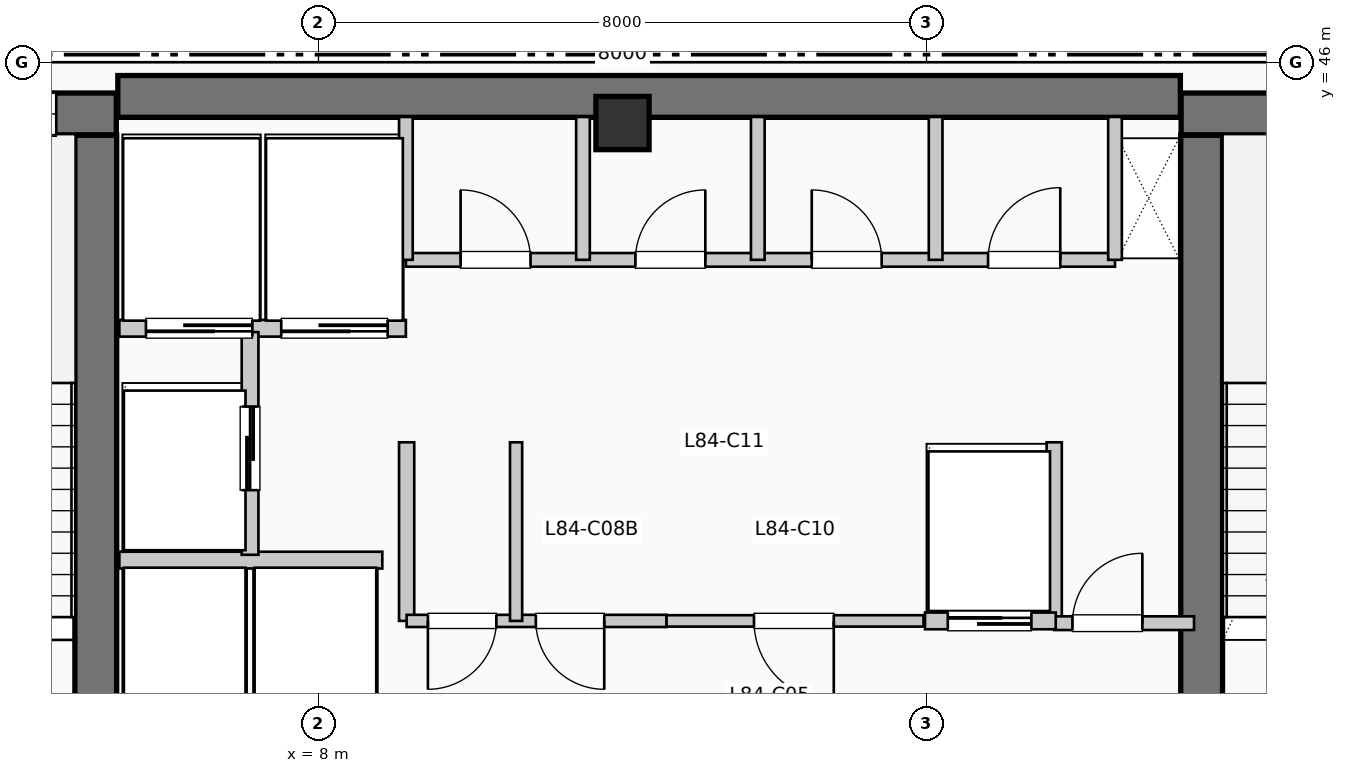
"""IFC4 building model, lengths in metres.
Left out: names, types, materials, properties, quantities, classifications, styles, units other than length and angle.
Written with IfcOpenShell. Run it as: python <this file> out.ifc"""

import sys

from ifc_helpers import new_model, si_unit, direction, frame, frame_2d, origin, origin_2d, place, context, subcontext, project, spatial, rectangle, extrude, element, fill, save


model = new_model("IFC4")
c1 = context("Model", 3, precision=1e-05, world=origin(), true_north=direction((0.0, 1.0)))
c2 = subcontext(c1, "Body", "Model", "MODEL_VIEW")
j1 = project(units=[si_unit("LENGTHUNIT", "METRE"), si_unit("PLANEANGLEUNIT", "RADIAN")], contexts=[c1])
p1 = place(None, origin())
s1 = spatial("IfcSite", under=j1, at=p1, CompositionType="ELEMENT")
p2 = place(p1, origin())
s2 = spatial("IfcBuilding", under=s1, at=p2, CompositionType="ELEMENT")
p3 = place(p2, frame((0.0, 0.0, 343.53)))
s3 = spatial("IfcBuildingStorey", under=s2, at=p3, CompositionType="ELEMENT", Elevation=343.53)
p4 = place(p3, frame((5.36, 45.55, 0.0), z_axis=(0.0, 0.0, 1.0), x_axis=(1.0, 0.0, 0.0)))
e1 = element("IfcWall", 1, at=p4, inside=s3, PredefinedType="SHEAR", context=c2, shape_type="SweptSolid", body=[
    extrude(rectangle(XDim=13.98, YDim=0.55, at=frame_2d((6.99, 0.0))), origin(), (0.0, 0.0, 1.0), 3.96),
])
p5 = place(p3, frame((5.07, 37.15, 0.0), z_axis=(0.0, 0.0, 1.0), x_axis=(0.0, 1.0, 0.0)))
e2 = element("IfcWall", 2, at=p5, inside=s3, PredefinedType="SHEAR", context=c2, shape_type="SweptSolid", body=[
    extrude(rectangle(XDim=7.89, YDim=0.55, at=frame_2d((3.945, 0.0))), origin(), (0.0, 0.0, 1.0), 3.96),
])
p6 = place(p3, frame((1.1, 45.32, 0.0), z_axis=(0.0, 0.0, 1.0), x_axis=(1.0, 0.0, 0.0)))
e3 = element("IfcWall", 3, at=p6, inside=s3, PredefinedType="SHEAR", context=c2, shape_type="SweptSolid", body=[
    extrude(rectangle(XDim=4.24, YDim=0.55, at=frame_2d((2.12, 0.0))), origin(), (0.0, 0.0, 1.0), 3.96),
])
p7 = place(p6, frame((2.05, 0.0, 1.05)))
e4 = element("IfcOpeningElement", 4, at=p7, cuts=e3, PredefinedType="OPENING", context=c2, shape_type="SweptSolid", body=[
    extrude(rectangle(XDim=1.4, YDim=1.8, at=frame_2d((0.7, 0.9))), frame((0.0, 0.285, 0.0), z_axis=(0.0, -1.0, 0.0), x_axis=(1.0, 0.0, 0.0)), (0.0, 0.0, 1.0), 0.57),
])
p8 = place(p3, frame((19.62, 37.15, 0.0), z_axis=(0.0, 0.0, 1.0), x_axis=(0.0, 1.0, 0.0)))
e5 = element("IfcWall", 5, at=p8, inside=s3, PredefinedType="SHEAR", context=c2, shape_type="SweptSolid", body=[
    extrude(rectangle(XDim=7.89, YDim=0.55, at=frame_2d((3.945, 0.0))), origin(), (0.0, 0.0, 1.0), 3.96),
])
p9 = place(p3, frame((19.35, 45.32, 0.0), z_axis=(0.0, 0.0, 1.0), x_axis=(1.0, 0.0, 0.0)))
e6 = element("IfcWall", 6, at=p9, inside=s3, PredefinedType="SHEAR", context=c2, shape_type="SweptSolid", body=[
    extrude(rectangle(XDim=3.69, YDim=0.55, at=frame_2d((1.845, 0.0))), origin(), (0.0, 0.0, 1.0), 3.96),
])
p10 = place(p9, frame((1.15, 0.0, 1.05)))
e7 = element("IfcOpeningElement", 7, at=p10, cuts=e6, PredefinedType="OPENING", context=c2, shape_type="SweptSolid", body=[
    extrude(rectangle(XDim=1.4, YDim=1.8, at=frame_2d((0.7, 0.9))), frame((0.0, 0.285, 0.0), z_axis=(0.0, -1.0, 0.0), x_axis=(1.0, 0.0, 0.0)), (0.0, 0.0, 1.0), 0.57),
])
p11 = place(p3, frame((12.0, 45.2, 0.0), z_axis=(0.0, 0.0, 1.0), x_axis=(1.0, 0.0, 0.0)))
e8 = element("IfcColumn", 8, at=p11, inside=s3, PredefinedType="COLUMN", context=c2, shape_type="SweptSolid", body=[
    extrude(rectangle(XDim=0.7, YDim=0.7, at=origin_2d()), origin(), (0.0, 0.0, 1.0), 3.96),
])
p12 = place(p3, frame((5.38, 39.45, 0.0), z_axis=(0.0, 0.0, 1.0), x_axis=(1.0, 0.0, 0.0)))
e9 = element("IfcWall", 9, at=p12, inside=s3, PredefinedType="PARTITIONING", context=c2, shape_type="SweptSolid", body=[
    extrude(rectangle(XDim=3.46, YDim=0.22, at=frame_2d((1.73, 0.0))), origin(), (0.0, 0.0, 1.0), 3.71),
])
p13 = place(p3, frame((5.38, 42.5, 0.0), z_axis=(0.0, 0.0, 1.0), x_axis=(1.0, 0.0, 0.0)))
e10 = element("IfcWall", 10, at=p13, inside=s3, PredefinedType="PARTITIONING", context=c2, shape_type="SweptSolid", body=[
    extrude(rectangle(XDim=3.77, YDim=0.22, at=frame_2d((1.885, 0.0))), origin(), (0.0, 0.0, 1.0), 3.71),
])
p14 = place(p13, frame((1.75, 0.0, 0.0), z_axis=(0.0, 0.0, 1.0), x_axis=(-1.0, 0.0, 0.0)))
e11 = element("IfcOpeningElement", 11, at=p14, cuts=e10, PredefinedType="OPENING", context=c2, shape_type="SweptSolid", body=[
    extrude(rectangle(XDim=1.4, YDim=2.2, at=frame_2d((0.7, 1.1))), frame((0.0, 0.12, 0.0), z_axis=(0.0, -1.0, 0.0), x_axis=(1.0, 0.0, 0.0)), (0.0, 0.0, 1.0), 0.24),
])
p15 = place(p13, frame((3.53, 0.0, 0.0), z_axis=(0.0, 0.0, 1.0), x_axis=(-1.0, 0.0, 0.0)))
e12 = element("IfcOpeningElement", 12, at=p15, cuts=e10, PredefinedType="OPENING", context=c2, shape_type="SweptSolid", body=[
    extrude(rectangle(XDim=1.4, YDim=2.2, at=frame_2d((0.7, 1.1))), frame((0.0, 0.12, 0.0), z_axis=(0.0, -1.0, 0.0), x_axis=(1.0, 0.0, 0.0)), (0.0, 0.0, 1.0), 0.24),
])
p16 = place(p3, frame((7.1, 39.52, 0.0), z_axis=(0.0, 0.0, 1.0), x_axis=(0.0, 1.0, 0.0)))
e13 = element("IfcWall", 13, at=p16, inside=s3, PredefinedType="PARTITIONING", context=c2, shape_type="SweptSolid", body=[
    extrude(rectangle(XDim=2.93, YDim=0.22, at=frame_2d((1.465, 0.0))), origin(), (0.0, 0.0, 1.0), 3.71),
])
p17 = place(p16, frame((0.85, 0.0, 0.0)))
e14 = element("IfcOpeningElement", 14, at=p17, cuts=e13, PredefinedType="OPENING", context=c2, shape_type="SweptSolid", body=[
    extrude(rectangle(XDim=1.1, YDim=2.2, at=frame_2d((0.55, 1.1))), frame((0.0, 0.12, 0.0), z_axis=(0.0, -1.0, 0.0), x_axis=(1.0, 0.0, 0.0)), (0.0, 0.0, 1.0), 0.24),
])
for number, where, z_axis, x_axis in (
    (15, (9.16, 38.65, 0.0), (0.0, 0.0, 1.0), (0.0, 1.0, 0.0)),
    (16, (17.68, 38.65, 0.0), (0.0, 0.0, 1.0), (0.0, 1.0, 0.0)),
):
    element("IfcWall", number, at=place(p3, frame(where, z_axis=z_axis, x_axis=x_axis)), inside=s3, PredefinedType="PARTITIONING", context=c2, shape_type="SweptSolid", body=[
        extrude(rectangle(XDim=2.35, YDim=0.2, at=frame_2d((1.175, 0.0))), origin(), (0.0, 0.0, 1.0), 3.71),
    ])
p18 = place(p3, frame((17.68, 38.62, 0.0), z_axis=(0.0, 0.0, 1.0), x_axis=(1.0, 0.0, 0.0)))
e17 = element("IfcWall", 17, at=p18, inside=s3, PredefinedType="PARTITIONING", context=c2, shape_type="SweptSolid", body=[
    extrude(rectangle(XDim=1.84, YDim=0.18, at=frame_2d((0.92, 0.0))), origin(), (0.0, 0.0, 1.0), 3.71),
])
p19 = place(p18, frame((0.24, 0.0, 0.0)))
e18 = element("IfcOpeningElement", 18, at=p19, cuts=e17, PredefinedType="OPENING", context=c2, shape_type="SweptSolid", body=[
    extrude(rectangle(XDim=0.92, YDim=2.1, at=frame_2d((0.46, 1.05))), frame((0.0, 0.1, 0.0), z_axis=(0.0, -1.0, 0.0), x_axis=(1.0, 0.0, 0.0)), (0.0, 0.0, 1.0), 0.2),
])
p20 = place(p3, frame((9.16, 38.65, 0.0), z_axis=(0.0, 0.0, 1.0), x_axis=(1.0, 0.0, 0.0)))
e19 = element("IfcWall", 19, at=p20, inside=s3, PredefinedType="PARTITIONING", context=c2, shape_type="SweptSolid", body=[
    extrude(rectangle(XDim=3.42, YDim=0.16, at=frame_2d((1.71, 0.0))), origin(), (0.0, 0.0, 1.0), 3.71),
])
p21 = place(p20, frame((1.18, 0.0, 0.0), z_axis=(0.0, 0.0, 1.0), x_axis=(-1.0, 0.0, 0.0)))
e20 = element("IfcOpeningElement", 20, at=p21, cuts=e19, PredefinedType="OPENING", context=c2, shape_type="SweptSolid", body=[
    extrude(rectangle(XDim=0.9, YDim=2.15, at=frame_2d((0.45, 1.075))), frame((0.0, 0.09, 0.0), z_axis=(0.0, -1.0, 0.0), x_axis=(1.0, 0.0, 0.0)), (0.0, 0.0, 1.0), 0.18),
])
p22 = place(p20, frame((2.6, 0.0, 0.0), z_axis=(0.0, 0.0, 1.0), x_axis=(-1.0, 0.0, 0.0)))
e21 = element("IfcOpeningElement", 21, at=p22, cuts=e19, PredefinedType="OPENING", context=c2, shape_type="SweptSolid", body=[
    extrude(rectangle(XDim=0.9, YDim=2.15, at=frame_2d((0.45, 1.075))), frame((0.0, 0.09, 0.0), z_axis=(0.0, -1.0, 0.0), x_axis=(1.0, 0.0, 0.0)), (0.0, 0.0, 1.0), 0.18),
])
p23 = place(p3, frame((10.6, 38.65, 0.0), z_axis=(0.0, 0.0, 1.0), x_axis=(0.0, 1.0, 0.0)))
e22 = element("IfcWall", 22, at=p23, inside=s3, PredefinedType="PARTITIONING", context=c2, shape_type="SweptSolid", body=[
    extrude(rectangle(XDim=2.35, YDim=0.16, at=frame_2d((1.175, 0.0))), origin(), (0.0, 0.0, 1.0), 3.71),
])
p24 = place(p3, frame((12.58, 38.65, 0.0), z_axis=(0.0, 0.0, 1.0), x_axis=(1.0, 0.0, 0.0)))
e23 = element("IfcWall", 23, at=p24, inside=s3, PredefinedType="PARTITIONING", context=c2, shape_type="SweptSolid", body=[
    extrude(rectangle(XDim=3.38, YDim=0.15, at=frame_2d((1.69, 0.0))), origin(), (0.0, 0.0, 1.0), 3.71),
])
p25 = place(p24, frame((2.2, 0.0, 0.0), z_axis=(0.0, 0.0, 1.0), x_axis=(-1.0, 0.0, 0.0)))
e24 = element("IfcOpeningElement", 24, at=p25, cuts=e23, PredefinedType="OPENING", context=c2, shape_type="SweptSolid", body=[
    extrude(rectangle(XDim=1.05, YDim=2.15, at=frame_2d((0.525, 1.075))), frame((0.0, 0.085, 0.0), z_axis=(0.0, -1.0, 0.0), x_axis=(1.0, 0.0, 0.0)), (0.0, 0.0, 1.0), 0.17),
])
p26 = place(p3, frame((15.98, 38.65, 0.0), z_axis=(0.0, 0.0, 1.0), x_axis=(1.0, 0.0, 0.0)))
e25 = element("IfcWall", 25, at=p26, inside=s3, PredefinedType="PARTITIONING", context=c2, shape_type="SweptSolid", body=[
    extrude(rectangle(XDim=1.72, YDim=0.22, at=frame_2d((0.86, 0.0))), origin(), (0.0, 0.0, 1.0), 3.71),
])
p27 = place(p26, frame((0.3, 0.0, 0.0)))
e26 = element("IfcOpeningElement", 26, at=p27, cuts=e25, PredefinedType="OPENING", context=c2, shape_type="SweptSolid", body=[
    extrude(rectangle(XDim=1.1, YDim=2.2, at=frame_2d((0.55, 1.1))), frame((0.0, 0.12, 0.0), z_axis=(0.0, -1.0, 0.0), x_axis=(1.0, 0.0, 0.0)), (0.0, 0.0, 1.0), 0.24),
])
p28 = place(p3, frame((9.15, 43.4, 0.0), z_axis=(0.0, 0.0, 1.0), x_axis=(1.0, 0.0, 0.0)))
e27 = element("IfcWall", 27, at=p28, inside=s3, PredefinedType="PLUMBINGWALL", context=c2, shape_type="SweptSolid", body=[
    extrude(rectangle(XDim=9.33, YDim=0.18, at=frame_2d((4.665, 0.0))), origin(), (0.0, 0.0, 1.0), 3.71),
])
p29 = place(p28, frame((0.72, 0.0, 0.0)))
e28 = element("IfcOpeningElement", 28, at=p29, cuts=e27, PredefinedType="OPENING", context=c2, shape_type="SweptSolid", body=[
    extrude(rectangle(XDim=0.92, YDim=2.1, at=frame_2d((0.46, 1.05))), frame((0.0, 0.1, 0.0), z_axis=(0.0, -1.0, 0.0), x_axis=(1.0, 0.0, 0.0)), (0.0, 0.0, 1.0), 0.2),
])
p30 = place(p28, frame((3.02, 0.0, 0.0)))
e29 = element("IfcOpeningElement", 29, at=p30, cuts=e27, PredefinedType="OPENING", context=c2, shape_type="SweptSolid", body=[
    extrude(rectangle(XDim=0.92, YDim=2.1, at=frame_2d((0.46, 1.05))), frame((0.0, 0.1, 0.0), z_axis=(0.0, -1.0, 0.0), x_axis=(1.0, 0.0, 0.0)), (0.0, 0.0, 1.0), 0.2),
])
p31 = place(p28, frame((5.34, 0.0, 0.0)))
e30 = element("IfcOpeningElement", 30, at=p31, cuts=e27, PredefinedType="OPENING", context=c2, shape_type="SweptSolid", body=[
    extrude(rectangle(XDim=0.92, YDim=2.1, at=frame_2d((0.46, 1.05))), frame((0.0, 0.1, 0.0), z_axis=(0.0, -1.0, 0.0), x_axis=(1.0, 0.0, 0.0)), (0.0, 0.0, 1.0), 0.2),
])
p32 = place(p28, frame((7.66, 0.0, 0.0)))
e31 = element("IfcOpeningElement", 31, at=p32, cuts=e27, PredefinedType="OPENING", context=c2, shape_type="SweptSolid", body=[
    extrude(rectangle(XDim=0.95, YDim=2.1, at=frame_2d((0.475, 1.05))), frame((0.0, 0.1, 0.0), z_axis=(0.0, -1.0, 0.0), x_axis=(1.0, 0.0, 0.0)), (0.0, 0.0, 1.0), 0.2),
])
for number, where, z_axis, x_axis in (
    (32, (9.15, 43.4, 0.0), (0.0, 0.0, 1.0), (0.0, 1.0, 0.0)),
    (33, (18.48, 43.4, 0.0), (0.0, 0.0, 1.0), (0.0, 1.0, 0.0)),
    (34, (11.48, 43.4, 0.0), (0.0, 0.0, 1.0), (0.0, 1.0, 0.0)),
    (35, (13.78, 43.4, 0.0), (0.0, 0.0, 1.0), (0.0, 1.0, 0.0)),
    (36, (16.12, 43.4, 0.0), (0.0, 0.0, 1.0), (0.0, 1.0, 0.0)),
):
    element("IfcWall", number, at=place(p3, frame(where, z_axis=z_axis, x_axis=x_axis)), inside=s3, PredefinedType="PLUMBINGWALL", context=c2, shape_type="SweptSolid", body=[
        extrude(rectangle(XDim=1.88, YDim=0.18, at=frame_2d((0.94, 0.0))), origin(), (0.0, 0.0, 1.0), 3.71),
    ])
p33 = place(p7, origin())
e37 = element("IfcWindow", 37, at=p33, inside=s3, PartitioningType="SINGLE_PANEL", PredefinedType="WINDOW", context=c2, shape_type="SweptSolid", body=[
    extrude(rectangle(XDim=1.4, YDim=1.8, at=frame_2d((0.7, 0.9))), frame((0.0, 0.03, 0.0), z_axis=(0.0, -1.0, 0.0), x_axis=(1.0, 0.0, 0.0)), (0.0, 0.0, 1.0), 0.06),
])
fill(e4, e37)
p34 = place(p14, origin())
e38 = element("IfcDoor", 38, at=p34, inside=s3, OperationType="SLIDING_TO_LEFT", PredefinedType="DOOR", context=c2, shape_type="SweptSolid", body=[
    extrude(rectangle(XDim=1.4, YDim=2.2, at=frame_2d((0.7, 1.1))), frame((0.0, 0.025, 0.0), z_axis=(0.0, -1.0, 0.0), x_axis=(1.0, 0.0, 0.0)), (0.0, 0.0, 1.0), 0.05),
])
fill(e11, e38)
p35 = place(p15, origin())
e39 = element("IfcDoor", 39, at=p35, inside=s3, OperationType="SLIDING_TO_LEFT", PredefinedType="DOOR", context=c2, shape_type="SweptSolid", body=[
    extrude(rectangle(XDim=1.4, YDim=2.2, at=frame_2d((0.7, 1.1))), frame((0.0, 0.025, 0.0), z_axis=(0.0, -1.0, 0.0), x_axis=(1.0, 0.0, 0.0)), (0.0, 0.0, 1.0), 0.05),
])
fill(e12, e39)
p36 = place(p17, origin())
e40 = element("IfcDoor", 40, at=p36, inside=s3, OperationType="SLIDING_TO_LEFT", PredefinedType="DOOR", context=c2, shape_type="SweptSolid", body=[
    extrude(rectangle(XDim=1.1, YDim=2.2, at=frame_2d((0.55, 1.1))), frame((0.0, 0.025, 0.0), z_axis=(0.0, -1.0, 0.0), x_axis=(1.0, 0.0, 0.0)), (0.0, 0.0, 1.0), 0.05),
])
fill(e14, e40)
p37 = place(p19, origin())
e41 = element("IfcDoor", 41, at=p37, inside=s3, OperationType="SINGLE_SWING_RIGHT", PredefinedType="DOOR", context=c2, shape_type="SweptSolid", body=[
    extrude(rectangle(XDim=0.92, YDim=2.1, at=frame_2d((0.46, 1.05))), frame((0.0, 0.025, 0.0), z_axis=(0.0, -1.0, 0.0), x_axis=(1.0, 0.0, 0.0)), (0.0, 0.0, 1.0), 0.05),
])
fill(e18, e41)
p38 = place(p21, origin())
e42 = element("IfcDoor", 42, at=p38, inside=s3, OperationType="SINGLE_SWING_LEFT", PredefinedType="DOOR", context=c2, shape_type="SweptSolid", body=[
    extrude(rectangle(XDim=0.9, YDim=2.15, at=frame_2d((0.45, 1.075))), frame((0.0, 0.025, 0.0), z_axis=(0.0, -1.0, 0.0), x_axis=(1.0, 0.0, 0.0)), (0.0, 0.0, 1.0), 0.05),
])
fill(e20, e42)
p39 = place(p22, origin())
e43 = element("IfcDoor", 43, at=p39, inside=s3, OperationType="SINGLE_SWING_RIGHT", PredefinedType="DOOR", context=c2, shape_type="SweptSolid", body=[
    extrude(rectangle(XDim=0.9, YDim=2.15, at=frame_2d((0.45, 1.075))), frame((0.0, 0.025, 0.0), z_axis=(0.0, -1.0, 0.0), x_axis=(1.0, 0.0, 0.0)), (0.0, 0.0, 1.0), 0.05),
])
fill(e21, e43)
p40 = place(p25, origin())
e44 = element("IfcDoor", 44, at=p40, inside=s3, OperationType="SINGLE_SWING_RIGHT", PredefinedType="DOOR", context=c2, shape_type="SweptSolid", body=[
    extrude(rectangle(XDim=1.05, YDim=2.15, at=frame_2d((0.525, 1.075))), frame((0.0, 0.025, 0.0), z_axis=(0.0, -1.0, 0.0), x_axis=(1.0, 0.0, 0.0)), (0.0, 0.0, 1.0), 0.05),
])
fill(e24, e44)
p41 = place(p27, origin())
e45 = element("IfcDoor", 45, at=p41, inside=s3, OperationType="SLIDING_TO_LEFT", PredefinedType="DOOR", context=c2, shape_type="SweptSolid", body=[
    extrude(rectangle(XDim=1.1, YDim=2.2, at=frame_2d((0.55, 1.1))), frame((0.0, 0.025, 0.0), z_axis=(0.0, -1.0, 0.0), x_axis=(1.0, 0.0, 0.0)), (0.0, 0.0, 1.0), 0.05),
])
fill(e26, e45)
p42 = place(p29, origin())
e46 = element("IfcDoor", 46, at=p42, inside=s3, OperationType="SINGLE_SWING_LEFT", PredefinedType="DOOR", context=c2, shape_type="SweptSolid", body=[
    extrude(rectangle(XDim=0.92, YDim=2.1, at=frame_2d((0.46, 1.05))), frame((0.0, 0.025, 0.0), z_axis=(0.0, -1.0, 0.0), x_axis=(1.0, 0.0, 0.0)), (0.0, 0.0, 1.0), 0.05),
])
fill(e28, e46)
p43 = place(p30, origin())
e47 = element("IfcDoor", 47, at=p43, inside=s3, OperationType="SINGLE_SWING_RIGHT", PredefinedType="DOOR", context=c2, shape_type="SweptSolid", body=[
    extrude(rectangle(XDim=0.92, YDim=2.1, at=frame_2d((0.46, 1.05))), frame((0.0, 0.025, 0.0), z_axis=(0.0, -1.0, 0.0), x_axis=(1.0, 0.0, 0.0)), (0.0, 0.0, 1.0), 0.05),
])
fill(e29, e47)
p44 = place(p31, origin())
e48 = element("IfcDoor", 48, at=p44, inside=s3, OperationType="SINGLE_SWING_LEFT", PredefinedType="DOOR", context=c2, shape_type="SweptSolid", body=[
    extrude(rectangle(XDim=0.92, YDim=2.1, at=frame_2d((0.46, 1.05))), frame((0.0, 0.025, 0.0), z_axis=(0.0, -1.0, 0.0), x_axis=(1.0, 0.0, 0.0)), (0.0, 0.0, 1.0), 0.05),
])
fill(e30, e48)
p45 = place(p32, origin())
e49 = element("IfcDoor", 49, at=p45, inside=s3, OperationType="SINGLE_SWING_RIGHT", PredefinedType="DOOR", context=c2, shape_type="SweptSolid", body=[
    extrude(rectangle(XDim=0.95, YDim=2.1, at=frame_2d((0.475, 1.05))), frame((0.0, 0.025, 0.0), z_axis=(0.0, -1.0, 0.0), x_axis=(1.0, 0.0, 0.0)), (0.0, 0.0, 1.0), 0.05),
])
fill(e31, e49)
save(model, sys.argv[1])
